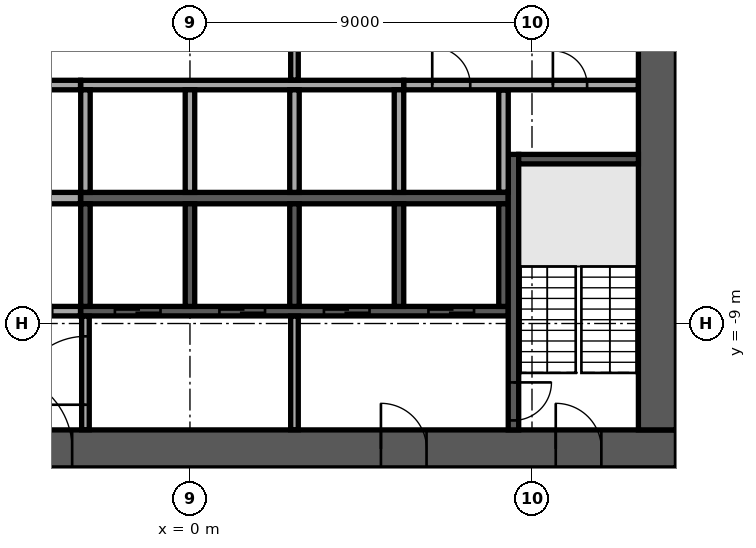
"""IFC4 building model, lengths in metres.
Left out: names, types, materials, properties, quantities, classifications, styles, units other than length and angle.
Written with IfcOpenShell. Run it as: python <this file> out.ifc"""

import sys

from ifc_helpers import new_model, si_unit, direction, frame, frame_2d, origin, place, context, subcontext, project, spatial, rectangle, extrude, element, fill, save


model = new_model("IFC4")
c1 = context("Model", 3, precision=1e-05, world=origin(), true_north=direction((0.0, 1.0)))
c2 = subcontext(c1, "Body", "Model", "MODEL_VIEW")
j1 = project(units=[si_unit("LENGTHUNIT", "METRE"), si_unit("PLANEANGLEUNIT", "RADIAN")], contexts=[c1])
p1 = place(None, origin())
s1 = spatial("IfcSite", under=j1, at=p1, CompositionType="ELEMENT")
p2 = place(p1, origin())
s2 = spatial("IfcBuilding", under=s1, at=p2, CompositionType="ELEMENT")
p3 = place(p2, frame((0.0, 0.0, 135.7)))
s3 = spatial("IfcBuildingStorey", under=s2, at=p3, CompositionType="ELEMENT", Elevation=135.7)
p4 = place(p3, frame((-12.8, -12.3, 0.0), z_axis=(0.0, 0.0, 1.0), x_axis=(1.0, 0.0, 0.0)))
e1 = element("IfcWall", 1, at=p4, inside=s3, PredefinedType="SHEAR", context=c2, shape_type="SweptSolid", body=[
    extrude(rectangle(XDim=25.6, YDim=1.0, at=frame_2d((12.8, 0.0))), origin(), (0.0, 0.0, 1.0), 3.6),
])
p5 = place(p4, frame((7.7, 0.0, 0.0)))
e2 = element("IfcOpeningElement", 2, at=p5, cuts=e1, PredefinedType="OPENING", context=c2, shape_type="SweptSolid", body=[
    extrude(rectangle(XDim=2.0, YDim=2.1, at=frame_2d((1.0, 1.05))), frame((0.0, 0.51, 0.0), z_axis=(0.0, -1.0, 0.0), x_axis=(1.0, 0.0, 0.0)), (0.0, 0.0, 1.0), 1.02),
])
p6 = place(p4, frame((17.825, 0.0, 0.0)))
e3 = element("IfcOpeningElement", 3, at=p6, cuts=e1, PredefinedType="OPENING", context=c2, shape_type="SweptSolid", body=[
    extrude(rectangle(XDim=1.2, YDim=2.1, at=frame_2d((0.6, 1.05))), frame((0.0, 0.51, 0.0), z_axis=(0.0, -1.0, 0.0), x_axis=(1.0, 0.0, 0.0)), (0.0, 0.0, 1.0), 1.02),
])
p7 = place(p4, frame((1.975, 0.0, 0.0)))
e4 = element("IfcOpeningElement", 4, at=p7, cuts=e1, PredefinedType="OPENING", context=c2, shape_type="SweptSolid", body=[
    extrude(rectangle(XDim=1.2, YDim=2.1, at=frame_2d((0.6, 1.05))), frame((0.0, 0.51, 0.0), z_axis=(0.0, -1.0, 0.0), x_axis=(1.0, 0.0, 0.0)), (0.0, 0.0, 1.0), 1.02),
])
p8 = place(p4, frame((22.425, 0.0, 0.0)))
e5 = element("IfcOpeningElement", 5, at=p8, cuts=e1, PredefinedType="OPENING", context=c2, shape_type="SweptSolid", body=[
    extrude(rectangle(XDim=1.2, YDim=2.1, at=frame_2d((0.6, 1.05))), frame((0.0, 0.51, 0.0), z_axis=(0.0, -1.0, 0.0), x_axis=(1.0, 0.0, 0.0)), (0.0, 0.0, 1.0), 1.02),
])
p9 = place(p3, frame((12.3, -11.8, 0.0), z_axis=(0.0, 0.0, 1.0), x_axis=(0.0, 1.0, 0.0)))
e6 = element("IfcWall", 6, at=p9, inside=s3, PredefinedType="SHEAR", context=c2, shape_type="SweptSolid", body=[
    extrude(rectangle(XDim=23.6, YDim=1.0, at=frame_2d((11.8, 0.0))), origin(), (0.0, 0.0, 1.0), 3.6),
])
p10 = place(p9, frame((10.6, 0.0, 0.0)))
e7 = element("IfcOpeningElement", 7, at=p10, cuts=e6, PredefinedType="OPENING", context=c2, shape_type="SweptSolid", body=[
    extrude(rectangle(XDim=2.4, YDim=2.4, at=frame_2d((1.2, 1.2))), frame((0.0, 0.51, 0.0), z_axis=(0.0, -1.0, 0.0), x_axis=(1.0, 0.0, 0.0)), (0.0, 0.0, 1.0), 1.02),
])
p11 = place(p3, frame((-2.875, -5.7, 0.0), z_axis=(0.0, 0.0, 1.0), x_axis=(1.0, 0.0, 0.0)))
e8 = element("IfcWall", 8, at=p11, inside=s3, PredefinedType="SOLIDWALL", context=c2, shape_type="SweptSolid", body=[
    extrude(rectangle(XDim=11.25, YDim=0.3, at=frame_2d((5.625, 0.0))), origin(), (0.0, 0.0, 1.0), 3.6),
])
p12 = place(p3, frame((-2.875, -2.725, 0.0), z_axis=(0.0, 0.0, 1.0), x_axis=(1.0, 0.0, 0.0)))
e9 = element("IfcWall", 9, at=p12, inside=s3, PredefinedType="SOLIDWALL", context=c2, shape_type="SweptSolid", body=[
    extrude(rectangle(XDim=8.5, YDim=0.25, at=frame_2d((4.25, 0.0))), origin(), (0.0, 0.0, 1.0), 3.6),
])
for number, where, z_axis, x_axis in (
    (10, (-2.75, -5.55, 0.0), (0.0, 0.0, 1.0), (0.0, 1.0, 0.0)),
    (11, (0.0, -5.55, 0.0), (0.0, 0.0, 1.0), (0.0, 1.0, 0.0)),
    (12, (2.75, -5.55, 0.0), (0.0, 0.0, 1.0), (0.0, 1.0, 0.0)),
    (13, (5.5, -5.55, 0.0), (0.0, 0.0, 1.0), (0.0, 1.0, 0.0)),
):
    element("IfcWall", number, at=place(p3, frame(where, z_axis=z_axis, x_axis=x_axis)), inside=s3, PredefinedType="SOLIDWALL", context=c2, shape_type="SweptSolid", body=[
        extrude(rectangle(XDim=2.7, YDim=0.25, at=frame_2d((1.35, 0.0))), origin(), (0.0, 0.0, 1.0), 3.6),
    ])
p13 = place(p3, frame((-2.875, -8.675, 0.0), z_axis=(0.0, 0.0, 1.0), x_axis=(1.0, 0.0, 0.0)))
e14 = element("IfcWall", 14, at=p13, inside=s3, PredefinedType="SOLIDWALL", context=c2, shape_type="SweptSolid", body=[
    extrude(rectangle(XDim=11.25, YDim=0.25, at=frame_2d((5.625, 0.0))), origin(), (0.0, 0.0, 1.0), 3.6),
])
p14 = place(p13, frame((0.9, 0.0, 0.0)))
e15 = element("IfcOpeningElement", 15, at=p14, cuts=e14, PredefinedType="OPENING", context=c2, shape_type="SweptSolid", body=[
    extrude(rectangle(XDim=1.2, YDim=2.1, at=frame_2d((0.6, 1.05))), frame((0.0, 0.135, 0.0), z_axis=(0.0, -1.0, 0.0), x_axis=(1.0, 0.0, 0.0)), (0.0, 0.0, 1.0), 0.27),
])
p15 = place(p13, frame((3.65, 0.0, 0.0)))
e16 = element("IfcOpeningElement", 16, at=p15, cuts=e14, PredefinedType="OPENING", context=c2, shape_type="SweptSolid", body=[
    extrude(rectangle(XDim=1.2, YDim=2.1, at=frame_2d((0.6, 1.05))), frame((0.0, 0.135, 0.0), z_axis=(0.0, -1.0, 0.0), x_axis=(1.0, 0.0, 0.0)), (0.0, 0.0, 1.0), 0.27),
])
p16 = place(p13, frame((6.4, 0.0, 0.0)))
e17 = element("IfcOpeningElement", 17, at=p16, cuts=e14, PredefinedType="OPENING", context=c2, shape_type="SweptSolid", body=[
    extrude(rectangle(XDim=1.2, YDim=2.1, at=frame_2d((0.6, 1.05))), frame((0.0, 0.135, 0.0), z_axis=(0.0, -1.0, 0.0), x_axis=(1.0, 0.0, 0.0)), (0.0, 0.0, 1.0), 0.27),
])
p17 = place(p13, frame((9.15, 0.0, 0.0)))
e18 = element("IfcOpeningElement", 18, at=p17, cuts=e14, PredefinedType="OPENING", context=c2, shape_type="SweptSolid", body=[
    extrude(rectangle(XDim=1.2, YDim=2.1, at=frame_2d((0.6, 1.05))), frame((0.0, 0.135, 0.0), z_axis=(0.0, -1.0, 0.0), x_axis=(1.0, 0.0, 0.0)), (0.0, 0.0, 1.0), 0.27),
])
for number, where, z_axis, x_axis in (
    (19, (-2.75, -8.55, 0.0), (0.0, 0.0, 1.0), (0.0, 1.0, 0.0)),
    (20, (0.0, -8.55, 0.0), (0.0, 0.0, 1.0), (0.0, 1.0, 0.0)),
    (21, (2.75, -8.55, 0.0), (0.0, 0.0, 1.0), (0.0, 1.0, 0.0)),
    (22, (5.5, -8.55, 0.0), (0.0, 0.0, 1.0), (0.0, 1.0, 0.0)),
    (23, (8.25, -8.55, 0.0), (0.0, 0.0, 1.0), (0.0, 1.0, 0.0)),
):
    element("IfcWall", number, at=place(p3, frame(where, z_axis=z_axis, x_axis=x_axis)), inside=s3, PredefinedType="SOLIDWALL", context=c2, shape_type="SweptSolid", body=[
        extrude(rectangle(XDim=2.7, YDim=0.25, at=frame_2d((1.35, 0.0))), origin(), (0.0, 0.0, 1.0), 3.6),
    ])
p18 = place(p3, frame((8.512, -4.55, 0.0), z_axis=(0.0, 0.0, 1.0), x_axis=(0.0, -1.0, 0.0)))
e24 = element("IfcWall", 24, at=p18, inside=s3, PredefinedType="SOLIDWALL", context=c2, shape_type="SweptSolid", body=[
    extrude(rectangle(XDim=7.25, YDim=0.275, at=frame_2d((3.625, 0.0))), origin(), (0.0, 0.0, 1.0), 3.6),
])
p19 = place(p18, frame((6.0, 0.0, 0.0)))
e25 = element("IfcOpeningElement", 25, at=p19, cuts=e24, PredefinedType="OPENING", context=c2, shape_type="SweptSolid", body=[
    extrude(rectangle(XDim=1.0, YDim=2.1, at=frame_2d((0.5, 1.05))), frame((0.0, 0.147, 0.0), z_axis=(0.0, -1.0, 0.0), x_axis=(1.0, 0.0, 0.0)), (0.0, 0.0, 1.0), 0.295),
])
p20 = place(p3, frame((8.65, -4.675, 0.0), z_axis=(0.0, 0.0, 1.0), x_axis=(1.0, 0.0, 0.0)))
e26 = element("IfcWall", 26, at=p20, inside=s3, PredefinedType="SOLIDWALL", context=c2, shape_type="SweptSolid", body=[
    extrude(rectangle(XDim=3.15, YDim=0.25, at=frame_2d((1.575, 0.0))), origin(), (0.0, 0.0, 1.0), 3.6),
])
p21 = place(p3, frame((-2.75, -11.795, 0.0), z_axis=(0.0, 0.0, 1.0), x_axis=(0.0, 1.0, 0.0)))
e27 = element("IfcWall", 27, at=p21, inside=s3, PredefinedType="PARTITIONING", context=c2, shape_type="SweptSolid", body=[
    extrude(rectangle(XDim=2.99, YDim=0.2, at=frame_2d((1.495, 0.0))), origin(), (0.0, 0.0, 1.0), 3.6),
])
p22 = place(p21, frame((0.657, 0.0, 0.0)))
e28 = element("IfcOpeningElement", 28, at=p22, cuts=e27, PredefinedType="OPENING", context=c2, shape_type="SweptSolid", body=[
    extrude(rectangle(XDim=1.8, YDim=2.1, at=frame_2d((0.9, 1.05))), frame((0.0, 0.11, 0.0), z_axis=(0.0, -1.0, 0.0), x_axis=(1.0, 0.0, 0.0)), (0.0, 0.0, 1.0), 0.22),
])
p23 = place(p3, frame((2.75, -11.795, 0.0), z_axis=(0.0, 0.0, 1.0), x_axis=(0.0, 1.0, 0.0)))
e29 = element("IfcWall", 29, at=p23, inside=s3, PredefinedType="PARTITIONING", context=c2, shape_type="SweptSolid", body=[
    extrude(rectangle(XDim=2.99, YDim=0.2, at=frame_2d((1.495, 0.0))), origin(), (0.0, 0.0, 1.0), 3.6),
])
p24 = place(p3, frame((-8.37, -8.675, 0.0), z_axis=(0.0, 0.0, 1.0), x_axis=(1.0, 0.0, 0.0)))
e30 = element("IfcWall", 30, at=p24, inside=s3, PredefinedType="PARTITIONING", context=c2, shape_type="SweptSolid", body=[
    extrude(rectangle(XDim=5.49, YDim=0.25, at=frame_2d((2.745, 0.0))), origin(), (0.0, 0.0, 1.0), 3.6),
])
p25 = place(p24, frame((0.995, 0.0, 0.0)))
e31 = element("IfcOpeningElement", 31, at=p25, cuts=e30, PredefinedType="OPENING", context=c2, shape_type="SweptSolid", body=[
    extrude(rectangle(XDim=1.0, YDim=2.1, at=frame_2d((0.5, 1.05))), frame((0.0, 0.135, 0.0), z_axis=(0.0, -1.0, 0.0), x_axis=(1.0, 0.0, 0.0)), (0.0, 0.0, 1.0), 0.27),
])
p26 = place(p24, frame((3.745, 0.0, 0.0)))
e32 = element("IfcOpeningElement", 32, at=p26, cuts=e30, PredefinedType="OPENING", context=c2, shape_type="SweptSolid", body=[
    extrude(rectangle(XDim=1.0, YDim=2.1, at=frame_2d((0.5, 1.05))), frame((0.0, 0.135, 0.0), z_axis=(0.0, -1.0, 0.0), x_axis=(1.0, 0.0, 0.0)), (0.0, 0.0, 1.0), 0.27),
])
p27 = place(p3, frame((-8.35, -5.7, 0.0), z_axis=(0.0, 0.0, 1.0), x_axis=(1.0, 0.0, 0.0)))
e33 = element("IfcWall", 33, at=p27, inside=s3, PredefinedType="PARTITIONING", context=c2, shape_type="SweptSolid", body=[
    extrude(rectangle(XDim=5.47, YDim=0.3, at=frame_2d((2.735, 0.0))), origin(), (0.0, 0.0, 1.0), 3.6),
])
p28 = place(p3, frame((8.25, -5.545, 0.0), z_axis=(0.0, 0.0, 1.0), x_axis=(0.0, 1.0, 0.0)))
e34 = element("IfcWall", 34, at=p28, inside=s3, PredefinedType="PARTITIONING", context=c2, shape_type="SweptSolid", body=[
    extrude(rectangle(XDim=2.69, YDim=0.25, at=frame_2d((1.345, 0.0))), origin(), (0.0, 0.0, 1.0), 3.6),
])
p29 = place(p3, frame((-11.795, -2.725, 0.0), z_axis=(0.0, 0.0, 1.0), x_axis=(1.0, 0.0, 0.0)))
e35 = element("IfcWall", 35, at=p29, inside=s3, PredefinedType="PARTITIONING", context=c2, shape_type="SweptSolid", body=[
    extrude(rectangle(XDim=8.915, YDim=0.25, at=frame_2d((4.458, 0.0))), origin(), (0.0, 0.0, 1.0), 3.6),
])
p30 = place(p29, frame((1.295, 0.0, 0.0)))
e36 = element("IfcOpeningElement", 36, at=p30, cuts=e35, PredefinedType="OPENING", context=c2, shape_type="SweptSolid", body=[
    extrude(rectangle(XDim=1.0, YDim=2.1, at=frame_2d((0.5, 1.05))), frame((0.0, 0.135, 0.0), z_axis=(0.0, -1.0, 0.0), x_axis=(1.0, 0.0, 0.0)), (0.0, 0.0, 1.0), 0.27),
])
p31 = place(p29, frame((4.42, 0.0, 0.0)))
e37 = element("IfcOpeningElement", 37, at=p31, cuts=e35, PredefinedType="OPENING", context=c2, shape_type="SweptSolid", body=[
    extrude(rectangle(XDim=1.0, YDim=2.1, at=frame_2d((0.5, 1.05))), frame((0.0, 0.135, 0.0), z_axis=(0.0, -1.0, 0.0), x_axis=(1.0, 0.0, 0.0)), (0.0, 0.0, 1.0), 0.27),
])
p32 = place(p3, frame((5.63, -2.725, 0.0), z_axis=(0.0, 0.0, 1.0), x_axis=(1.0, 0.0, 0.0)))
e38 = element("IfcWall", 38, at=p32, inside=s3, PredefinedType="PARTITIONING", context=c2, shape_type="SweptSolid", body=[
    extrude(rectangle(XDim=6.165, YDim=0.25, at=frame_2d((3.083, 0.0))), origin(), (0.0, 0.0, 1.0), 3.6),
])
p33 = place(p32, frame((0.745, 0.0, 0.0)))
e39 = element("IfcOpeningElement", 39, at=p33, cuts=e38, PredefinedType="OPENING", context=c2, shape_type="SweptSolid", body=[
    extrude(rectangle(XDim=1.0, YDim=2.1, at=frame_2d((0.5, 1.05))), frame((0.0, 0.135, 0.0), z_axis=(0.0, -1.0, 0.0), x_axis=(1.0, 0.0, 0.0)), (0.0, 0.0, 1.0), 0.27),
])
p34 = place(p32, frame((3.92, 0.0, 0.0)))
e40 = element("IfcOpeningElement", 40, at=p34, cuts=e38, PredefinedType="OPENING", context=c2, shape_type="SweptSolid", body=[
    extrude(rectangle(XDim=0.9, YDim=2.1, at=frame_2d((0.45, 1.05))), frame((0.0, 0.135, 0.0), z_axis=(0.0, -1.0, 0.0), x_axis=(1.0, 0.0, 0.0)), (0.0, 0.0, 1.0), 0.27),
])
p35 = place(p3, frame((2.75, -2.595, 0.0), z_axis=(0.0, 0.0, 1.0), x_axis=(0.0, 1.0, 0.0)))
e41 = element("IfcWall", 41, at=p35, inside=s3, PredefinedType="PARTITIONING", context=c2, shape_type="SweptSolid", body=[
    extrude(rectangle(XDim=5.19, YDim=0.2, at=frame_2d((2.595, 0.0))), origin(), (0.0, 0.0, 1.0), 3.6),
])
p36 = place(p35, frame((1.395, 0.0, 0.0)))
e42 = element("IfcOpeningElement", 42, at=p36, cuts=e41, PredefinedType="OPENING", context=c2, shape_type="SweptSolid", body=[
    extrude(rectangle(XDim=2.4, YDim=2.4, at=frame_2d((1.2, 1.2))), frame((0.0, 0.11, 0.0), z_axis=(0.0, -1.0, 0.0), x_axis=(1.0, 0.0, 0.0)), (0.0, 0.0, 1.0), 0.22),
])
p37 = place(p3, frame((-9.103, -34.888, 0.0), z_axis=(0.0, 0.0, 1.0), x_axis=(0.874618897425, 0.484811081007, 0.0)))
e43 = element("IfcWall", 43, at=p37, inside=s3, PredefinedType="STANDARD", context=c2, shape_type="SweptSolid", body=[
    extrude(rectangle(XDim=49.751, YDim=0.6, at=frame_2d((24.876, 0.0))), origin(), (0.0, 0.0, 1.0), 3.6),
])
p38 = place(p37, frame((1.161, 0.0, 0.9)))
e44 = element("IfcOpeningElement", 44, at=p38, cuts=e43, PredefinedType="OPENING", context=c2, shape_type="SweptSolid", body=[
    extrude(rectangle(XDim=2.1, YDim=2.1, at=frame_2d((1.05, 1.05))), frame((0.0, 0.31, 0.0), z_axis=(0.0, -1.0, 0.0), x_axis=(1.0, 0.0, 0.0)), (0.0, 0.0, 1.0), 0.62),
])
p39 = place(p37, frame((5.644, 0.0, 0.9)))
e45 = element("IfcOpeningElement", 45, at=p39, cuts=e43, PredefinedType="OPENING", context=c2, shape_type="SweptSolid", body=[
    extrude(rectangle(XDim=2.1, YDim=2.1, at=frame_2d((1.05, 1.05))), frame((0.0, 0.31, 0.0), z_axis=(0.0, -1.0, 0.0), x_axis=(1.0, 0.0, 0.0)), (0.0, 0.0, 1.0), 0.62),
])
p40 = place(p37, frame((10.189, 0.0, 0.9)))
e46 = element("IfcOpeningElement", 46, at=p40, cuts=e43, PredefinedType="OPENING", context=c2, shape_type="SweptSolid", body=[
    extrude(rectangle(XDim=2.1, YDim=2.1, at=frame_2d((1.05, 1.05))), frame((0.0, 0.31, 0.0), z_axis=(0.0, -1.0, 0.0), x_axis=(1.0, 0.0, 0.0)), (0.0, 0.0, 1.0), 0.62),
])
p41 = place(p37, frame((14.735, 0.0, 0.9)))
e47 = element("IfcOpeningElement", 47, at=p41, cuts=e43, PredefinedType="OPENING", context=c2, shape_type="SweptSolid", body=[
    extrude(rectangle(XDim=2.1, YDim=2.1, at=frame_2d((1.05, 1.05))), frame((0.0, 0.31, 0.0), z_axis=(0.0, -1.0, 0.0), x_axis=(1.0, 0.0, 0.0)), (0.0, 0.0, 1.0), 0.62),
])
p42 = place(p37, frame((19.28, 0.0, 0.9)))
e48 = element("IfcOpeningElement", 48, at=p42, cuts=e43, PredefinedType="OPENING", context=c2, shape_type="SweptSolid", body=[
    extrude(rectangle(XDim=2.1, YDim=2.1, at=frame_2d((1.05, 1.05))), frame((0.0, 0.31, 0.0), z_axis=(0.0, -1.0, 0.0), x_axis=(1.0, 0.0, 0.0)), (0.0, 0.0, 1.0), 0.62),
])
p43 = place(p37, frame((23.826, 0.0, 0.9)))
e49 = element("IfcOpeningElement", 49, at=p43, cuts=e43, PredefinedType="OPENING", context=c2, shape_type="SweptSolid", body=[
    extrude(rectangle(XDim=2.1, YDim=2.1, at=frame_2d((1.05, 1.05))), frame((0.0, 0.31, 0.0), z_axis=(0.0, -1.0, 0.0), x_axis=(1.0, 0.0, 0.0)), (0.0, 0.0, 1.0), 0.62),
])
p44 = place(p37, frame((28.371, 0.0, 0.9)))
e50 = element("IfcOpeningElement", 50, at=p44, cuts=e43, PredefinedType="OPENING", context=c2, shape_type="SweptSolid", body=[
    extrude(rectangle(XDim=2.1, YDim=2.1, at=frame_2d((1.05, 1.05))), frame((0.0, 0.31, 0.0), z_axis=(0.0, -1.0, 0.0), x_axis=(1.0, 0.0, 0.0)), (0.0, 0.0, 1.0), 0.62),
])
p45 = place(p37, frame((32.917, 0.0, 0.9)))
e51 = element("IfcOpeningElement", 51, at=p45, cuts=e43, PredefinedType="OPENING", context=c2, shape_type="SweptSolid", body=[
    extrude(rectangle(XDim=2.1, YDim=2.1, at=frame_2d((1.05, 1.05))), frame((0.0, 0.31, 0.0), z_axis=(0.0, -1.0, 0.0), x_axis=(1.0, 0.0, 0.0)), (0.0, 0.0, 1.0), 0.62),
])
p46 = place(p37, frame((37.462, 0.0, 0.9)))
e52 = element("IfcOpeningElement", 52, at=p46, cuts=e43, PredefinedType="OPENING", context=c2, shape_type="SweptSolid", body=[
    extrude(rectangle(XDim=2.1, YDim=2.1, at=frame_2d((1.05, 1.05))), frame((0.0, 0.31, 0.0), z_axis=(0.0, -1.0, 0.0), x_axis=(1.0, 0.0, 0.0)), (0.0, 0.0, 1.0), 0.62),
])
p47 = place(p37, frame((42.008, 0.0, 0.9)))
e53 = element("IfcOpeningElement", 53, at=p47, cuts=e43, PredefinedType="OPENING", context=c2, shape_type="SweptSolid", body=[
    extrude(rectangle(XDim=2.1, YDim=2.1, at=frame_2d((1.05, 1.05))), frame((0.0, 0.31, 0.0), z_axis=(0.0, -1.0, 0.0), x_axis=(1.0, 0.0, 0.0)), (0.0, 0.0, 1.0), 0.62),
])
p48 = place(p37, frame((46.491, 0.0, 0.9)))
e54 = element("IfcOpeningElement", 54, at=p48, cuts=e43, PredefinedType="OPENING", context=c2, shape_type="SweptSolid", body=[
    extrude(rectangle(XDim=2.1, YDim=2.1, at=frame_2d((1.05, 1.05))), frame((0.0, 0.31, 0.0), z_axis=(0.0, -1.0, 0.0), x_axis=(1.0, 0.0, 0.0)), (0.0, 0.0, 1.0), 0.62),
])
p49 = place(p3, frame((-4.484, -24.462, 0.0), z_axis=(0.0, 0.0, 1.0), x_axis=(0.874618059696, 0.484812592301, 0.0)))
e55 = element("IfcWall", 55, at=p49, inside=s3, PredefinedType="PARTITIONING", context=c2, shape_type="SweptSolid", body=[
    extrude(rectangle(XDim=31.638, YDim=0.15, at=frame_2d((15.819, 0.0))), origin(), (0.0, 0.0, 1.0), 3.15),
])
p50 = place(p49, frame((9.25, 0.0, 0.0)))
e56 = element("IfcOpeningElement", 56, at=p50, cuts=e55, PredefinedType="OPENING", context=c2, shape_type="SweptSolid", body=[
    extrude(rectangle(XDim=1.0, YDim=2.1, at=frame_2d((0.5, 1.05))), frame((0.0, 0.085, 0.0), z_axis=(0.0, -1.0, 0.0), x_axis=(1.0, 0.0, 0.0)), (0.0, 0.0, 1.0), 0.17),
])
p51 = place(p49, frame((19.239, 0.0, 0.0)))
e57 = element("IfcOpeningElement", 57, at=p51, cuts=e55, PredefinedType="OPENING", context=c2, shape_type="SweptSolid", body=[
    extrude(rectangle(XDim=1.0, YDim=2.1, at=frame_2d((0.5, 1.05))), frame((0.0, 0.085, 0.0), z_axis=(0.0, -1.0, 0.0), x_axis=(1.0, 0.0, 0.0)), (0.0, 0.0, 1.0), 0.17),
])
p52 = place(p49, frame((24.772, 0.0, 0.0)))
e58 = element("IfcOpeningElement", 58, at=p52, cuts=e55, PredefinedType="OPENING", context=c2, shape_type="SweptSolid", body=[
    extrude(rectangle(XDim=1.0, YDim=2.1, at=frame_2d((0.5, 1.05))), frame((0.0, 0.085, 0.0), z_axis=(0.0, -1.0, 0.0), x_axis=(1.0, 0.0, 0.0)), (0.0, 0.0, 1.0), 0.17),
])
p53 = place(p5, origin())
e59 = element("IfcDoor", 59, at=p53, inside=s3, OperationType="SINGLE_SWING_LEFT", PredefinedType="DOOR", context=c2, shape_type="SweptSolid", body=[
    extrude(rectangle(XDim=2.0, YDim=2.1, at=frame_2d((1.0, 1.05))), frame((0.0, 0.025, 0.0), z_axis=(0.0, -1.0, 0.0), x_axis=(1.0, 0.0, 0.0)), (0.0, 0.0, 1.0), 0.05),
])
fill(e2, e59)
p54 = place(p6, origin())
e60 = element("IfcDoor", 60, at=p54, inside=s3, OperationType="SINGLE_SWING_LEFT", PredefinedType="DOOR", context=c2, shape_type="SweptSolid", body=[
    extrude(rectangle(XDim=1.2, YDim=2.1, at=frame_2d((0.6, 1.05))), frame((0.0, 0.025, 0.0), z_axis=(0.0, -1.0, 0.0), x_axis=(1.0, 0.0, 0.0)), (0.0, 0.0, 1.0), 0.05),
])
fill(e3, e60)
p55 = place(p8, origin())
e61 = element("IfcDoor", 61, at=p55, inside=s3, OperationType="SINGLE_SWING_LEFT", PredefinedType="DOOR", context=c2, shape_type="SweptSolid", body=[
    extrude(rectangle(XDim=1.2, YDim=2.1, at=frame_2d((0.6, 1.05))), frame((0.0, 0.025, 0.0), z_axis=(0.0, -1.0, 0.0), x_axis=(1.0, 0.0, 0.0)), (0.0, 0.0, 1.0), 0.05),
])
fill(e5, e61)
p56 = place(p14, origin())
e62 = element("IfcDoor", 62, at=p56, inside=s3, OperationType="DOUBLE_DOOR_SLIDING", PredefinedType="DOOR", context=c2, shape_type="SweptSolid", body=[
    extrude(rectangle(XDim=1.2, YDim=2.1, at=frame_2d((0.6, 1.05))), frame((0.0, 0.025, 0.0), z_axis=(0.0, -1.0, 0.0), x_axis=(1.0, 0.0, 0.0)), (0.0, 0.0, 1.0), 0.05),
])
fill(e15, e62)
p57 = place(p15, origin())
e63 = element("IfcDoor", 63, at=p57, inside=s3, OperationType="DOUBLE_DOOR_SLIDING", PredefinedType="DOOR", context=c2, shape_type="SweptSolid", body=[
    extrude(rectangle(XDim=1.2, YDim=2.1, at=frame_2d((0.6, 1.05))), frame((0.0, 0.025, 0.0), z_axis=(0.0, -1.0, 0.0), x_axis=(1.0, 0.0, 0.0)), (0.0, 0.0, 1.0), 0.05),
])
fill(e16, e63)
p58 = place(p16, origin())
e64 = element("IfcDoor", 64, at=p58, inside=s3, OperationType="DOUBLE_DOOR_SLIDING", PredefinedType="DOOR", context=c2, shape_type="SweptSolid", body=[
    extrude(rectangle(XDim=1.2, YDim=2.1, at=frame_2d((0.6, 1.05))), frame((0.0, 0.025, 0.0), z_axis=(0.0, -1.0, 0.0), x_axis=(1.0, 0.0, 0.0)), (0.0, 0.0, 1.0), 0.05),
])
fill(e17, e64)
p59 = place(p17, origin())
e65 = element("IfcDoor", 65, at=p59, inside=s3, OperationType="DOUBLE_DOOR_SLIDING", PredefinedType="DOOR", context=c2, shape_type="SweptSolid", body=[
    extrude(rectangle(XDim=1.2, YDim=2.1, at=frame_2d((0.6, 1.05))), frame((0.0, 0.025, 0.0), z_axis=(0.0, -1.0, 0.0), x_axis=(1.0, 0.0, 0.0)), (0.0, 0.0, 1.0), 0.05),
])
fill(e18, e65)
p60 = place(p19, origin())
e66 = element("IfcDoor", 66, at=p60, inside=s3, OperationType="SINGLE_SWING_LEFT", PredefinedType="DOOR", context=c2, shape_type="SweptSolid", body=[
    extrude(rectangle(XDim=1.0, YDim=2.1, at=frame_2d((0.5, 1.05))), frame((0.0, 0.025, 0.0), z_axis=(0.0, -1.0, 0.0), x_axis=(1.0, 0.0, 0.0)), (0.0, 0.0, 1.0), 0.05),
])
fill(e25, e66)
p61 = place(p33, origin())
e67 = element("IfcDoor", 67, at=p61, inside=s3, OperationType="SINGLE_SWING_RIGHT", PredefinedType="DOOR", context=c2, shape_type="SweptSolid", body=[
    extrude(rectangle(XDim=1.0, YDim=2.1, at=frame_2d((0.5, 1.05))), frame((0.0, 0.025, 0.0), z_axis=(0.0, -1.0, 0.0), x_axis=(1.0, 0.0, 0.0)), (0.0, 0.0, 1.0), 0.05),
])
fill(e39, e67)
p62 = place(p34, origin())
e68 = element("IfcDoor", 68, at=p62, inside=s3, OperationType="SINGLE_SWING_RIGHT", PredefinedType="DOOR", context=c2, shape_type="SweptSolid", body=[
    extrude(rectangle(XDim=0.9, YDim=2.1, at=frame_2d((0.45, 1.05))), frame((0.0, 0.025, 0.0), z_axis=(0.0, -1.0, 0.0), x_axis=(1.0, 0.0, 0.0)), (0.0, 0.0, 1.0), 0.05),
])
fill(e40, e68)
p63 = place(p22, origin())
e69 = element("IfcDoor", 69, at=p63, inside=s3, OperationType="SINGLE_SWING_LEFT", PredefinedType="DOOR", context=c2, shape_type="SweptSolid", body=[
    extrude(rectangle(XDim=1.8, YDim=2.1, at=frame_2d((0.9, 1.05))), frame((0.0, 0.025, 0.0), z_axis=(0.0, -1.0, 0.0), x_axis=(1.0, 0.0, 0.0)), (0.0, 0.0, 1.0), 0.05),
])
fill(e28, e69)
save(model, sys.argv[1])
